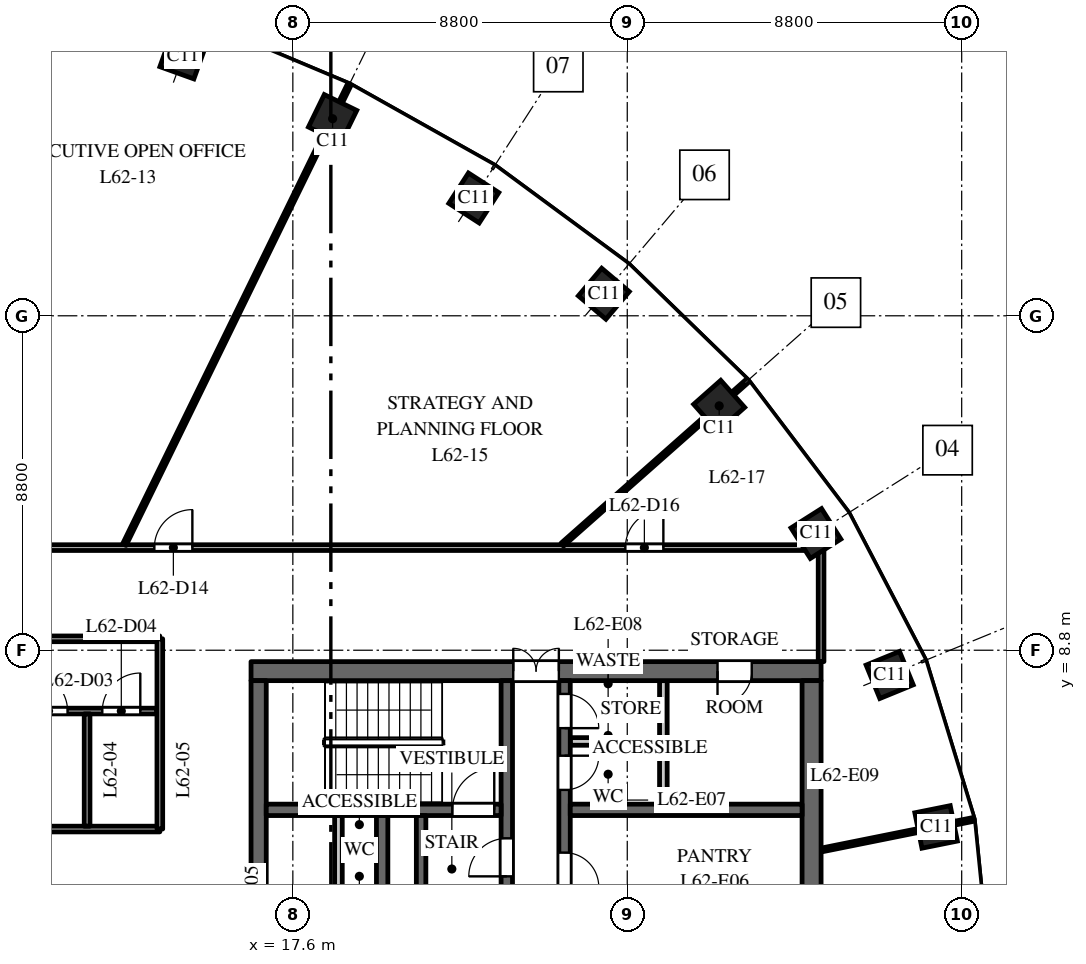
"""IFC4 building model, lengths in metres.
Left out: names, types, materials, properties, quantities, classifications, styles, units other than length and angle.
Written with IfcOpenShell. Run it as: python <this file> out.ifc"""

import sys

from ifc_helpers import new_model, si_unit, direction, frame, frame_2d, origin, origin_2d, place, context, subcontext, project, spatial, rectangle, extrude, element, fill, save


model = new_model("IFC4")
c1 = context("Model", 3, precision=1e-05, world=origin(), true_north=direction((0.0, 1.0)))
c2 = subcontext(c1, "Body", "Model", "MODEL_VIEW")
j1 = project(units=[si_unit("LENGTHUNIT", "METRE"), si_unit("PLANEANGLEUNIT", "RADIAN")], contexts=[c1])
p1 = place(None, origin())
s1 = spatial("IfcSite", under=j1, at=p1, CompositionType="ELEMENT")
p2 = place(p1, origin())
s2 = spatial("IfcBuilding", under=s1, at=p2, CompositionType="ELEMENT")
p3 = place(p2, frame((0.0, 0.0, 291.0)))
s3 = spatial("IfcBuildingStorey", under=s2, at=p3, CompositionType="ELEMENT", Elevation=291.0)
for number, where, z_axis, x_axis in (
    (1, (34.527, 4.151, 0.0), (0.0, 0.0, 1.0), (-0.197, 0.98, 0.0)),
    (2, (33.305, 8.149, 0.0), (0.0, 0.0, 1.0), (-0.379, 0.925, 0.0)),
    (3, (31.365, 11.871, 0.0), (0.0, 0.0, 1.0), (-0.535, 0.845, 0.0)),
    (4, (28.819, 15.23, 0.0), (0.0, 0.0, 1.0), (-0.663, 0.749, 0.0)),
    (5, (25.783, 18.18, 0.0), (0.0, 0.0, 1.0), (-0.763, 0.646, 0.0)),
    (6, (22.362, 20.7, 0.0), (0.0, 0.0, 1.0), (-0.84, 0.542, 0.0)),
    (7, (18.646, 22.785, 0.0), (0.0, 0.0, 1.0), (-0.898, 0.439, 0.0)),
    (8, (14.709, 24.441, 0.0), (0.0, 0.0, 1.0), (-0.941, 0.338, 0.0)),
):
    element("IfcColumn", number, at=place(p3, frame(where, z_axis=z_axis, x_axis=x_axis)), inside=s3, PredefinedType="COLUMN", context=c2, shape_type="SweptSolid", body=[
        extrude(rectangle(XDim=0.95, YDim=0.95, at=origin_2d()), origin(), (0.0, 0.0, 1.0), 4.0),
    ])
p4 = place(p3, frame((16.5, 8.25, 0.0), z_axis=(0.0, 0.0, 1.0), x_axis=(1.0, 0.0, 0.0)))
e9 = element("IfcWall", 9, at=p4, inside=s3, PredefinedType="SHEAR", context=c2, shape_type="SweptSolid", body=[
    extrude(rectangle(XDim=15.0, YDim=0.5, at=frame_2d((7.5, 0.0))), origin(), (0.0, 0.0, 1.0), 3.7),
])
p5 = place(p4, frame((6.9, 0.0, 0.0)))
e10 = element("IfcOpeningElement", 10, at=p5, cuts=e9, PredefinedType="OPENING", context=c2, shape_type="SweptSolid", body=[
    extrude(rectangle(XDim=1.2, YDim=2.1, at=frame_2d((0.6, 1.05))), frame((0.0, 0.26, 0.0), z_axis=(0.0, -1.0, 0.0), x_axis=(1.0, 0.0, 0.0)), (0.0, 0.0, 1.0), 0.52),
])
p6 = place(p4, frame((12.275, 0.0, 0.0)))
e11 = element("IfcOpeningElement", 11, at=p6, cuts=e9, PredefinedType="OPENING", context=c2, shape_type="SweptSolid", body=[
    extrude(rectangle(XDim=0.9, YDim=2.1, at=frame_2d((0.45, 1.05))), frame((0.0, 0.26, 0.0), z_axis=(0.0, -1.0, 0.0), x_axis=(1.0, 0.0, 0.0)), (0.0, 0.0, 1.0), 0.52),
])
p7 = place(p3, frame((18.8, -0.45, 0.0), z_axis=(0.0, 0.0, 1.0), x_axis=(0.0, 1.0, 0.0)))
e12 = element("IfcWall", 12, at=p7, inside=s3, PredefinedType="PARTITIONING", context=c2, shape_type="SweptSolid", body=[
    extrude(rectangle(XDim=4.9, YDim=0.2, at=frame_2d((2.45, 0.0))), origin(), (0.0, 0.0, 1.0), 3.7),
])
p8 = place(p7, frame((2.0, 0.0, 0.0)))
e13 = element("IfcOpeningElement", 13, at=p8, cuts=e12, PredefinedType="OPENING", context=c2, shape_type="SweptSolid", body=[
    extrude(rectangle(XDim=0.9, YDim=2.1, at=frame_2d((0.45, 1.05))), frame((0.0, 0.11, 0.0), z_axis=(0.0, -1.0, 0.0), x_axis=(1.0, 0.0, 0.0)), (0.0, 0.0, 1.0), 0.22),
])
p9 = place(p3, frame((19.95, -4.45, 0.0), z_axis=(0.0, 0.0, 1.0), x_axis=(0.0, 1.0, 0.0)))
e14 = element("IfcWall", 14, at=p9, inside=s3, PredefinedType="SHEAR", context=c2, shape_type="SweptSolid", body=[
    extrude(rectangle(XDim=8.9, YDim=0.3, at=frame_2d((4.45, 0.0))), origin(), (0.0, 0.0, 1.0), 3.7),
])
p10 = place(p9, frame((0.775, 0.0, 0.0)))
e15 = element("IfcOpeningElement", 15, at=p10, cuts=e14, PredefinedType="OPENING", context=c2, shape_type="SweptSolid", body=[
    extrude(rectangle(XDim=1.2, YDim=2.1, at=frame_2d((0.6, 1.05))), frame((0.0, 0.16, 0.0), z_axis=(0.0, -1.0, 0.0), x_axis=(1.0, 0.0, 0.0)), (0.0, 0.0, 1.0), 0.32),
])
p11 = place(p9, frame((6.0, 0.0, 0.0)))
e16 = element("IfcOpeningElement", 16, at=p11, cuts=e14, PredefinedType="OPENING", context=c2, shape_type="SweptSolid", body=[
    extrude(rectangle(XDim=0.9, YDim=2.1, at=frame_2d((0.45, 1.05))), frame((0.0, 0.16, 0.0), z_axis=(0.0, -1.0, 0.0), x_axis=(1.0, 0.0, 0.0)), (0.0, 0.0, 1.0), 0.32),
])
p12 = place(p3, frame((24.75, -8.0, 0.0), z_axis=(0.0, 0.0, 1.0), x_axis=(0.0, 1.0, 0.0)))
e17 = element("IfcWall", 17, at=p12, inside=s3, PredefinedType="SHEAR", context=c2, shape_type="SweptSolid", body=[
    extrude(rectangle(XDim=16.0, YDim=0.3, at=frame_2d((8.0, 0.0))), origin(), (0.0, 0.0, 1.0), 3.7),
])
p13 = place(p12, frame((4.425, 0.0, 0.0)))
e18 = element("IfcOpeningElement", 18, at=p13, cuts=e17, PredefinedType="OPENING", context=c2, shape_type="SweptSolid", body=[
    extrude(rectangle(XDim=1.1, YDim=2.1, at=frame_2d((0.55, 1.05))), frame((0.0, 0.16, 0.0), z_axis=(0.0, -1.0, 0.0), x_axis=(1.0, 0.0, 0.0)), (0.0, 0.0, 1.0), 0.32),
])
p14 = place(p12, frame((7.45, 0.0, 0.0)))
e19 = element("IfcOpeningElement", 19, at=p14, cuts=e17, PredefinedType="OPENING", context=c2, shape_type="SweptSolid", body=[
    extrude(rectangle(XDim=1.1, YDim=2.1, at=frame_2d((0.55, 1.05))), frame((0.0, 0.16, 0.0), z_axis=(0.0, -1.0, 0.0), x_axis=(1.0, 0.0, 0.0)), (0.0, 0.0, 1.0), 0.32),
])
p15 = place(p12, frame((10.575, 0.0, 0.0)))
e20 = element("IfcOpeningElement", 20, at=p15, cuts=e17, PredefinedType="OPENING", context=c2, shape_type="SweptSolid", body=[
    extrude(rectangle(XDim=0.9, YDim=2.1, at=frame_2d((0.45, 1.05))), frame((0.0, 0.16, 0.0), z_axis=(0.0, -1.0, 0.0), x_axis=(1.0, 0.0, 0.0)), (0.0, 0.0, 1.0), 0.32),
])
p16 = place(p12, frame((13.125, 0.0, 0.0)))
e21 = element("IfcOpeningElement", 21, at=p16, cuts=e17, PredefinedType="OPENING", context=c2, shape_type="SweptSolid", body=[
    extrude(rectangle(XDim=0.9, YDim=2.1, at=frame_2d((0.45, 1.05))), frame((0.0, 0.16, 0.0), z_axis=(0.0, -1.0, 0.0), x_axis=(1.0, 0.0, 0.0)), (0.0, 0.0, 1.0), 0.32),
])
p17 = place(p12, frame((14.75, 0.0, 0.0)))
e22 = element("IfcOpeningElement", 22, at=p17, cuts=e17, PredefinedType="OPENING", context=c2, shape_type="SweptSolid", body=[
    extrude(rectangle(XDim=0.9, YDim=2.1, at=frame_2d((0.45, 1.05))), frame((0.0, 0.16, 0.0), z_axis=(0.0, -1.0, 0.0), x_axis=(1.0, 0.0, 0.0)), (0.0, 0.0, 1.0), 0.32),
])
p18 = place(p12, frame((1.35, 0.0, 0.0)))
e23 = element("IfcOpeningElement", 23, at=p18, cuts=e17, PredefinedType="OPENING", context=c2, shape_type="SweptSolid", body=[
    extrude(rectangle(XDim=0.9, YDim=2.1, at=frame_2d((0.45, 1.05))), frame((0.0, 0.16, 0.0), z_axis=(0.0, -1.0, 0.0), x_axis=(1.0, 0.0, 0.0)), (0.0, 0.0, 1.0), 0.32),
])
p19 = place(p3, frame((16.7, -8.0, 0.0), z_axis=(0.0, 0.0, 1.0), x_axis=(0.0, 1.0, 0.0)))
e24 = element("IfcWall", 24, at=p19, inside=s3, PredefinedType="SHEAR", context=c2, shape_type="SweptSolid", body=[
    extrude(rectangle(XDim=16.0, YDim=0.4, at=frame_2d((8.0, 0.0))), origin(), (0.0, 0.0, 1.0), 3.7),
])
p20 = place(p3, frame((31.25, -8.0, 0.0), z_axis=(0.0, 0.0, 1.0), x_axis=(0.0, 1.0, 0.0)))
e25 = element("IfcWall", 25, at=p20, inside=s3, PredefinedType="SHEAR", context=c2, shape_type="SweptSolid", body=[
    extrude(rectangle(XDim=16.0, YDim=0.5, at=frame_2d((8.0, 0.0))), origin(), (0.0, 0.0, 1.0), 3.7),
])
p21 = place(p3, frame((24.9, 4.6, 0.0), z_axis=(0.0, 0.0, 1.0), x_axis=(1.0, 0.0, 0.0)))
e26 = element("IfcWall", 26, at=p21, inside=s3, PredefinedType="SHEAR", context=c2, shape_type="SweptSolid", body=[
    extrude(rectangle(XDim=6.1, YDim=0.3, at=frame_2d((3.05, 0.0))), origin(), (0.0, 0.0, 1.0), 3.7),
])
p22 = place(p3, frame((27.35, 4.75, 0.0), z_axis=(0.0, 0.0, 1.0), x_axis=(0.0, 1.0, 0.0)))
e27 = element("IfcWall", 27, at=p22, inside=s3, PredefinedType="PARTITIONING", context=c2, shape_type="SweptSolid", body=[
    extrude(rectangle(XDim=3.25, YDim=0.2, at=frame_2d((1.625, 0.0))), origin(), (0.0, 0.0, 1.0), 3.7),
])
p23 = place(p3, frame((24.9, 6.4, 0.0), z_axis=(0.0, 0.0, 1.0), x_axis=(1.0, 0.0, 0.0)))
e28 = element("IfcWall", 28, at=p23, inside=s3, PredefinedType="PARTITIONING", context=c2, shape_type="SweptSolid", body=[
    extrude(rectangle(XDim=2.35, YDim=0.2, at=frame_2d((1.175, 0.0))), origin(), (0.0, 0.0, 1.0), 3.7),
])
p24 = place(p3, frame((23.23, 2.25, 0.0), z_axis=(0.0, 0.0, 1.0), x_axis=(0.0, 1.0, 0.0)))
e29 = element("IfcWall", 29, at=p24, inside=s3, PredefinedType="SHEAR", context=c2, shape_type="SweptSolid", body=[
    extrude(rectangle(XDim=5.75, YDim=0.3, at=frame_2d((2.875, 0.0))), origin(), (0.0, 0.0, 1.0), 3.7),
])
p25 = place(p24, frame((0.6, 0.0, 0.0)))
e30 = element("IfcOpeningElement", 30, at=p25, cuts=e29, PredefinedType="OPENING", context=c2, shape_type="SweptSolid", body=[
    extrude(rectangle(XDim=1.0, YDim=2.1, at=frame_2d((0.5, 1.05))), frame((0.0, 0.16, 0.0), z_axis=(0.0, -1.0, 0.0), x_axis=(1.0, 0.0, 0.0)), (0.0, 0.0, 1.0), 0.32),
])
p26 = place(p3, frame((16.9, 4.6, 0.0), z_axis=(0.0, 0.0, 1.0), x_axis=(1.0, 0.0, 0.0)))
e31 = element("IfcWall", 31, at=p26, inside=s3, PredefinedType="SHEAR", context=c2, shape_type="SweptSolid", body=[
    extrude(rectangle(XDim=6.18, YDim=0.3, at=frame_2d((3.09, 0.0))), origin(), (0.0, 0.0, 1.0), 3.7),
])
p27 = place(p26, frame((4.9, 0.0, 0.0)))
e32 = element("IfcOpeningElement", 32, at=p27, cuts=e31, PredefinedType="OPENING", context=c2, shape_type="SweptSolid", body=[
    extrude(rectangle(XDim=1.1, YDim=2.1, at=frame_2d((0.55, 1.05))), frame((0.0, 0.16, 0.0), z_axis=(0.0, -1.0, 0.0), x_axis=(1.0, 0.0, 0.0)), (0.0, 0.0, 1.0), 0.32),
])
p28 = place(p3, frame((20.975, 2.25, 0.0), z_axis=(0.0, 0.0, 1.0), x_axis=(0.0, 1.0, 0.0)))
e33 = element("IfcWall", 33, at=p28, inside=s3, PredefinedType="SHEAR", context=c2, shape_type="SweptSolid", body=[
    extrude(rectangle(XDim=2.2, YDim=0.25, at=frame_2d((1.1, 0.0))), origin(), (0.0, 0.0, 1.0), 3.7),
])
p29 = place(p3, frame((-31.5, 11.5, 0.0), z_axis=(0.0, 0.0, 1.0), x_axis=(1.0, 0.0, 0.0)))
e34 = element("IfcWall", 34, at=p29, inside=s3, PredefinedType="PARTITIONING", context=c2, shape_type="SweptSolid", body=[
    extrude(rectangle(XDim=63.0, YDim=0.15, at=frame_2d((31.5, 0.0))), origin(), (0.0, 0.0, 1.0), 2.75),
])
p30 = place(p29, frame((16.471, 0.0, 0.0)))
e35 = element("IfcOpeningElement", 35, at=p30, cuts=e34, PredefinedType="OPENING", context=c2, shape_type="SweptSolid", body=[
    extrude(rectangle(XDim=1.0, YDim=2.1, at=frame_2d((0.5, 1.05))), frame((0.0, 0.085, 0.0), z_axis=(0.0, -1.0, 0.0), x_axis=(1.0, 0.0, 0.0)), (0.0, 0.0, 1.0), 0.17),
])
p31 = place(p29, frame((19.062, 0.0, 0.0)))
e36 = element("IfcOpeningElement", 36, at=p31, cuts=e34, PredefinedType="OPENING", context=c2, shape_type="SweptSolid", body=[
    extrude(rectangle(XDim=1.0, YDim=2.1, at=frame_2d((0.5, 1.05))), frame((0.0, 0.085, 0.0), z_axis=(0.0, -1.0, 0.0), x_axis=(1.0, 0.0, 0.0)), (0.0, 0.0, 1.0), 0.17),
])
p32 = place(p29, frame((26.531, 0.0, 0.0)))
e37 = element("IfcOpeningElement", 37, at=p32, cuts=e34, PredefinedType="OPENING", context=c2, shape_type="SweptSolid", body=[
    extrude(rectangle(XDim=1.0, YDim=2.1, at=frame_2d((0.5, 1.05))), frame((0.0, 0.085, 0.0), z_axis=(0.0, -1.0, 0.0), x_axis=(1.0, 0.0, 0.0)), (0.0, 0.0, 1.0), 0.17),
])
p33 = place(p29, frame((33.738, 0.0, 0.0)))
e38 = element("IfcOpeningElement", 38, at=p33, cuts=e34, PredefinedType="OPENING", context=c2, shape_type="SweptSolid", body=[
    extrude(rectangle(XDim=1.0, YDim=2.1, at=frame_2d((0.5, 1.05))), frame((0.0, 0.085, 0.0), z_axis=(0.0, -1.0, 0.0), x_axis=(1.0, 0.0, 0.0)), (0.0, 0.0, 1.0), 0.17),
])
p34 = place(p29, frame((45.456, 0.0, 0.0)))
e39 = element("IfcOpeningElement", 39, at=p34, cuts=e34, PredefinedType="OPENING", context=c2, shape_type="SweptSolid", body=[
    extrude(rectangle(XDim=1.0, YDim=2.1, at=frame_2d((0.5, 1.05))), frame((0.0, 0.085, 0.0), z_axis=(0.0, -1.0, 0.0), x_axis=(1.0, 0.0, 0.0)), (0.0, 0.0, 1.0), 0.17),
])
p35 = place(p29, frame((57.85, 0.0, 0.0)))
e40 = element("IfcOpeningElement", 40, at=p35, cuts=e34, PredefinedType="OPENING", context=c2, shape_type="SweptSolid", body=[
    extrude(rectangle(XDim=1.0, YDim=2.1, at=frame_2d((0.5, 1.05))), frame((0.0, 0.085, 0.0), z_axis=(0.0, -1.0, 0.0), x_axis=(1.0, 0.0, 0.0)), (0.0, 0.0, 1.0), 0.17),
])
p36 = place(p3, frame((1.005, 13.435, 0.0), z_axis=(0.0, 0.0, 1.0), x_axis=(0.646459104718, 0.762948639115, 0.0)))
e41 = element("IfcWall", 41, at=p36, inside=s3, PredefinedType="PARTITIONING", context=c2, shape_type="SweptSolid", body=[
    extrude(rectangle(XDim=16.892, YDim=0.1, at=frame_2d((8.446, 0.0))), origin(), (0.0, 0.0, 1.0), 2.85),
])
p37 = place(p3, frame((1.8, 9.1, 0.0), z_axis=(0.0, 0.0, 1.0), x_axis=(1.0, 0.0, 0.0)))
e42 = element("IfcWall", 42, at=p37, inside=s3, PredefinedType="PARTITIONING", context=c2, shape_type="SweptSolid", body=[
    extrude(rectangle(XDim=12.3, YDim=0.15, at=frame_2d((6.15, 0.0))), origin(), (0.0, 0.0, 1.0), 2.85),
])
p38 = place(p37, frame((2.9, 0.0, 0.0)))
e43 = element("IfcOpeningElement", 43, at=p38, cuts=e42, PredefinedType="OPENING", context=c2, shape_type="SweptSolid", body=[
    extrude(rectangle(XDim=1.0, YDim=2.1, at=frame_2d((0.5, 1.05))), frame((0.0, 0.085, 0.0), z_axis=(0.0, -1.0, 0.0), x_axis=(1.0, 0.0, 0.0)), (0.0, 0.0, 1.0), 0.17),
])
p39 = place(p3, frame((2.364, 7.2, 0.0), z_axis=(0.0, 0.0, 1.0), x_axis=(1.0, 0.0, 0.0)))
e44 = element("IfcWall", 44, at=p39, inside=s3, PredefinedType="PARTITIONING", context=c2, shape_type="SweptSolid", body=[
    extrude(rectangle(XDim=11.661, YDim=0.15, at=frame_2d((5.831, 0.0))), origin(), (0.0, 0.0, 1.0), 2.75),
])
p40 = place(p39, frame((6.204, 0.0, 0.0)))
e45 = element("IfcOpeningElement", 45, at=p40, cuts=e44, PredefinedType="OPENING", context=c2, shape_type="SweptSolid", body=[
    extrude(rectangle(XDim=1.0, YDim=2.1, at=frame_2d((0.5, 1.05))), frame((0.0, 0.085, 0.0), z_axis=(0.0, -1.0, 0.0), x_axis=(1.0, 0.0, 0.0)), (0.0, 0.0, 1.0), 0.17),
])
p41 = place(p39, frame((8.308, 0.0, 0.0)))
e46 = element("IfcOpeningElement", 46, at=p41, cuts=e44, PredefinedType="OPENING", context=c2, shape_type="SweptSolid", body=[
    extrude(rectangle(XDim=1.0, YDim=2.1, at=frame_2d((0.5, 1.05))), frame((0.0, 0.085, 0.0), z_axis=(0.0, -1.0, 0.0), x_axis=(1.0, 0.0, 0.0)), (0.0, 0.0, 1.0), 0.17),
])
p42 = place(p39, frame((10.222, 0.0, 0.0)))
e47 = element("IfcOpeningElement", 47, at=p42, cuts=e44, PredefinedType="OPENING", context=c2, shape_type="SweptSolid", body=[
    extrude(rectangle(XDim=1.0, YDim=2.1, at=frame_2d((0.5, 1.05))), frame((0.0, 0.085, 0.0), z_axis=(0.0, -1.0, 0.0), x_axis=(1.0, 0.0, 0.0)), (0.0, 0.0, 1.0), 0.17),
])
p43 = place(p3, frame((7.497, 4.095, 0.0), z_axis=(0.0, 0.0, 1.0), x_axis=(1.0, 0.0, 0.0)))
e48 = element("IfcWall", 48, at=p43, inside=s3, PredefinedType="PARTITIONING", context=c2, shape_type="SweptSolid", body=[
    extrude(rectangle(XDim=6.603, YDim=0.15, at=frame_2d((3.302, 0.0))), origin(), (0.0, 0.0, 1.0), 3.0),
])
p44 = place(p3, frame((12.186, 4.17, 0.0), z_axis=(0.0, 0.0, 1.0), x_axis=(0.0, 1.0, 0.0)))
e49 = element("IfcWall", 49, at=p44, inside=s3, PredefinedType="PARTITIONING", context=c2, shape_type="SweptSolid", body=[
    extrude(rectangle(XDim=2.955, YDim=0.15, at=frame_2d((1.478, 0.0))), origin(), (0.0, 0.0, 1.0), 2.75),
])
p45 = place(p3, frame((13.167, 11.579, 0.0), z_axis=(0.0, 0.0, 1.0), x_axis=(0.439238726833, 0.898370380661, 0.0)))
e50 = element("IfcWall", 50, at=p45, inside=s3, PredefinedType="PARTITIONING", context=c2, shape_type="SweptSolid", body=[
    extrude(rectangle(XDim=13.475, YDim=0.1, at=frame_2d((6.738, 0.0))), origin(), (0.0, 0.0, 1.0), 3.0),
])
p46 = place(p3, frame((14.1, 4.095, 0.0), z_axis=(0.0, 0.0, 1.0), x_axis=(0.0, 1.0, 0.0)))
e51 = element("IfcWall", 51, at=p46, inside=s3, PredefinedType="PARTITIONING", context=c2, shape_type="SweptSolid", body=[
    extrude(rectangle(XDim=5.005, YDim=0.15, at=frame_2d((2.502, 0.0))), origin(), (0.0, 0.0, 1.0), 2.75),
])
p47 = place(p3, frame((24.689, 11.578, 0.0), z_axis=(0.0, 0.0, 1.0), x_axis=(0.748988695283, 0.662582775461, 0.0)))
e52 = element("IfcWall", 52, at=p47, inside=s3, PredefinedType="PARTITIONING", context=c2, shape_type="SweptSolid", body=[
    extrude(rectangle(XDim=6.516, YDim=0.1, at=frame_2d((3.258, 0.0))), origin(), (0.0, 0.0, 1.0), 2.75),
])
p48 = place(p3, frame((31.5, 3.542, 0.0), z_axis=(0.0, 0.0, 1.0), x_axis=(0.980357474535, 0.197228857227, 0.0)))
e53 = element("IfcWall", 53, at=p48, inside=s3, PredefinedType="PARTITIONING", context=c2, shape_type="SweptSolid", body=[
    extrude(rectangle(XDim=4.092, YDim=0.1, at=frame_2d((2.046, 0.0))), origin(), (0.0, 0.0, 1.0), 3.0),
])
p49 = place(p3, frame((31.5, 8.5, 0.0), z_axis=(0.0, 0.0, 1.0), x_axis=(0.0, 1.0, 0.0)))
e54 = element("IfcWall", 54, at=p49, inside=s3, PredefinedType="PARTITIONING", context=c2, shape_type="SweptSolid", body=[
    extrude(rectangle(XDim=3.0, YDim=0.15, at=frame_2d((1.5, 0.0))), origin(), (0.0, 0.0, 1.0), 3.0),
])
p50 = place(p27, origin())
e55 = element("IfcDoor", 55, at=p50, inside=s3, OperationType="SINGLE_SWING_LEFT", PredefinedType="DOOR", context=c2, shape_type="SweptSolid", body=[
    extrude(rectangle(XDim=1.1, YDim=2.1, at=frame_2d((0.55, 1.05))), frame((0.0, 0.025, 0.0), z_axis=(0.0, -1.0, 0.0), x_axis=(1.0, 0.0, 0.0)), (0.0, 0.0, 1.0), 0.05),
])
fill(e32, e55)
p51 = place(p25, origin())
e56 = element("IfcDoor", 56, at=p51, inside=s3, OperationType="SINGLE_SWING_RIGHT", PredefinedType="DOOR", context=c2, shape_type="SweptSolid", body=[
    extrude(rectangle(XDim=1.0, YDim=2.1, at=frame_2d((0.5, 1.05))), frame((0.0, 0.025, 0.0), z_axis=(0.0, -1.0, 0.0), x_axis=(1.0, 0.0, 0.0)), (0.0, 0.0, 1.0), 0.05),
])
fill(e30, e56)
p52 = place(p5, origin())
e57 = element("IfcDoor", 57, at=p52, inside=s3, OperationType="DOUBLE_DOOR_DOUBLE_SWING", PredefinedType="DOOR", context=c2, shape_type="SweptSolid", body=[
    extrude(rectangle(XDim=1.2, YDim=2.1, at=frame_2d((0.6, 1.05))), frame((0.0, 0.025, 0.0), z_axis=(0.0, -1.0, 0.0), x_axis=(1.0, 0.0, 0.0)), (0.0, 0.0, 1.0), 0.05),
])
fill(e10, e57)
p53 = place(p15, origin())
e58 = element("IfcDoor", 58, at=p53, inside=s3, OperationType="SINGLE_SWING_LEFT", PredefinedType="DOOR", context=c2, shape_type="SweptSolid", body=[
    extrude(rectangle(XDim=0.9, YDim=2.1, at=frame_2d((0.45, 1.05))), frame((0.0, 0.025, 0.0), z_axis=(0.0, -1.0, 0.0), x_axis=(1.0, 0.0, 0.0)), (0.0, 0.0, 1.0), 0.05),
])
fill(e20, e58)
p54 = place(p16, origin())
e59 = element("IfcDoor", 59, at=p54, inside=s3, OperationType="SINGLE_SWING_RIGHT", PredefinedType="DOOR", context=c2, shape_type="SweptSolid", body=[
    extrude(rectangle(XDim=0.9, YDim=2.1, at=frame_2d((0.45, 1.05))), frame((0.0, 0.025, 0.0), z_axis=(0.0, -1.0, 0.0), x_axis=(1.0, 0.0, 0.0)), (0.0, 0.0, 1.0), 0.05),
])
fill(e21, e59)
p55 = place(p17, origin())
e60 = element("IfcDoor", 60, at=p55, inside=s3, OperationType="SINGLE_SWING_LEFT", PredefinedType="DOOR", context=c2, shape_type="SweptSolid", body=[
    extrude(rectangle(XDim=0.9, YDim=2.1, at=frame_2d((0.45, 1.05))), frame((0.0, 0.025, 0.0), z_axis=(0.0, -1.0, 0.0), x_axis=(1.0, 0.0, 0.0)), (0.0, 0.0, 1.0), 0.05),
])
fill(e22, e60)
p56 = place(p6, origin())
e61 = element("IfcDoor", 61, at=p56, inside=s3, OperationType="SINGLE_SWING_LEFT", PredefinedType="DOOR", context=c2, shape_type="SweptSolid", body=[
    extrude(rectangle(XDim=0.9, YDim=2.1, at=frame_2d((0.45, 1.05))), frame((0.0, 0.025, 0.0), z_axis=(0.0, -1.0, 0.0), x_axis=(1.0, 0.0, 0.0)), (0.0, 0.0, 1.0), 0.05),
])
fill(e11, e61)
p57 = place(p41, origin())
e62 = element("IfcDoor", 62, at=p57, inside=s3, OperationType="SINGLE_SWING_LEFT", PredefinedType="DOOR", context=c2, shape_type="SweptSolid", body=[
    extrude(rectangle(XDim=1.0, YDim=2.1, at=frame_2d((0.5, 1.05))), frame((0.0, 0.025, 0.0), z_axis=(0.0, -1.0, 0.0), x_axis=(1.0, 0.0, 0.0)), (0.0, 0.0, 1.0), 0.05),
])
fill(e46, e62)
p58 = place(p42, origin())
e63 = element("IfcDoor", 63, at=p58, inside=s3, OperationType="SINGLE_SWING_RIGHT", PredefinedType="DOOR", context=c2, shape_type="SweptSolid", body=[
    extrude(rectangle(XDim=1.0, YDim=2.1, at=frame_2d((0.5, 1.05))), frame((0.0, 0.025, 0.0), z_axis=(0.0, -1.0, 0.0), x_axis=(1.0, 0.0, 0.0)), (0.0, 0.0, 1.0), 0.05),
])
fill(e47, e63)
p59 = place(p34, origin())
e64 = element("IfcDoor", 64, at=p59, inside=s3, OperationType="SINGLE_SWING_RIGHT", PredefinedType="DOOR", context=c2, shape_type="SweptSolid", body=[
    extrude(rectangle(XDim=1.0, YDim=2.1, at=frame_2d((0.5, 1.05))), frame((0.0, 0.025, 0.0), z_axis=(0.0, -1.0, 0.0), x_axis=(1.0, 0.0, 0.0)), (0.0, 0.0, 1.0), 0.05),
])
fill(e39, e64)
p60 = place(p35, origin())
e65 = element("IfcDoor", 65, at=p60, inside=s3, OperationType="SINGLE_SWING_RIGHT", PredefinedType="DOOR", context=c2, shape_type="SweptSolid", body=[
    extrude(rectangle(XDim=1.0, YDim=2.1, at=frame_2d((0.5, 1.05))), frame((0.0, 0.025, 0.0), z_axis=(0.0, -1.0, 0.0), x_axis=(1.0, 0.0, 0.0)), (0.0, 0.0, 1.0), 0.05),
])
fill(e40, e65)
save(model, sys.argv[1])
